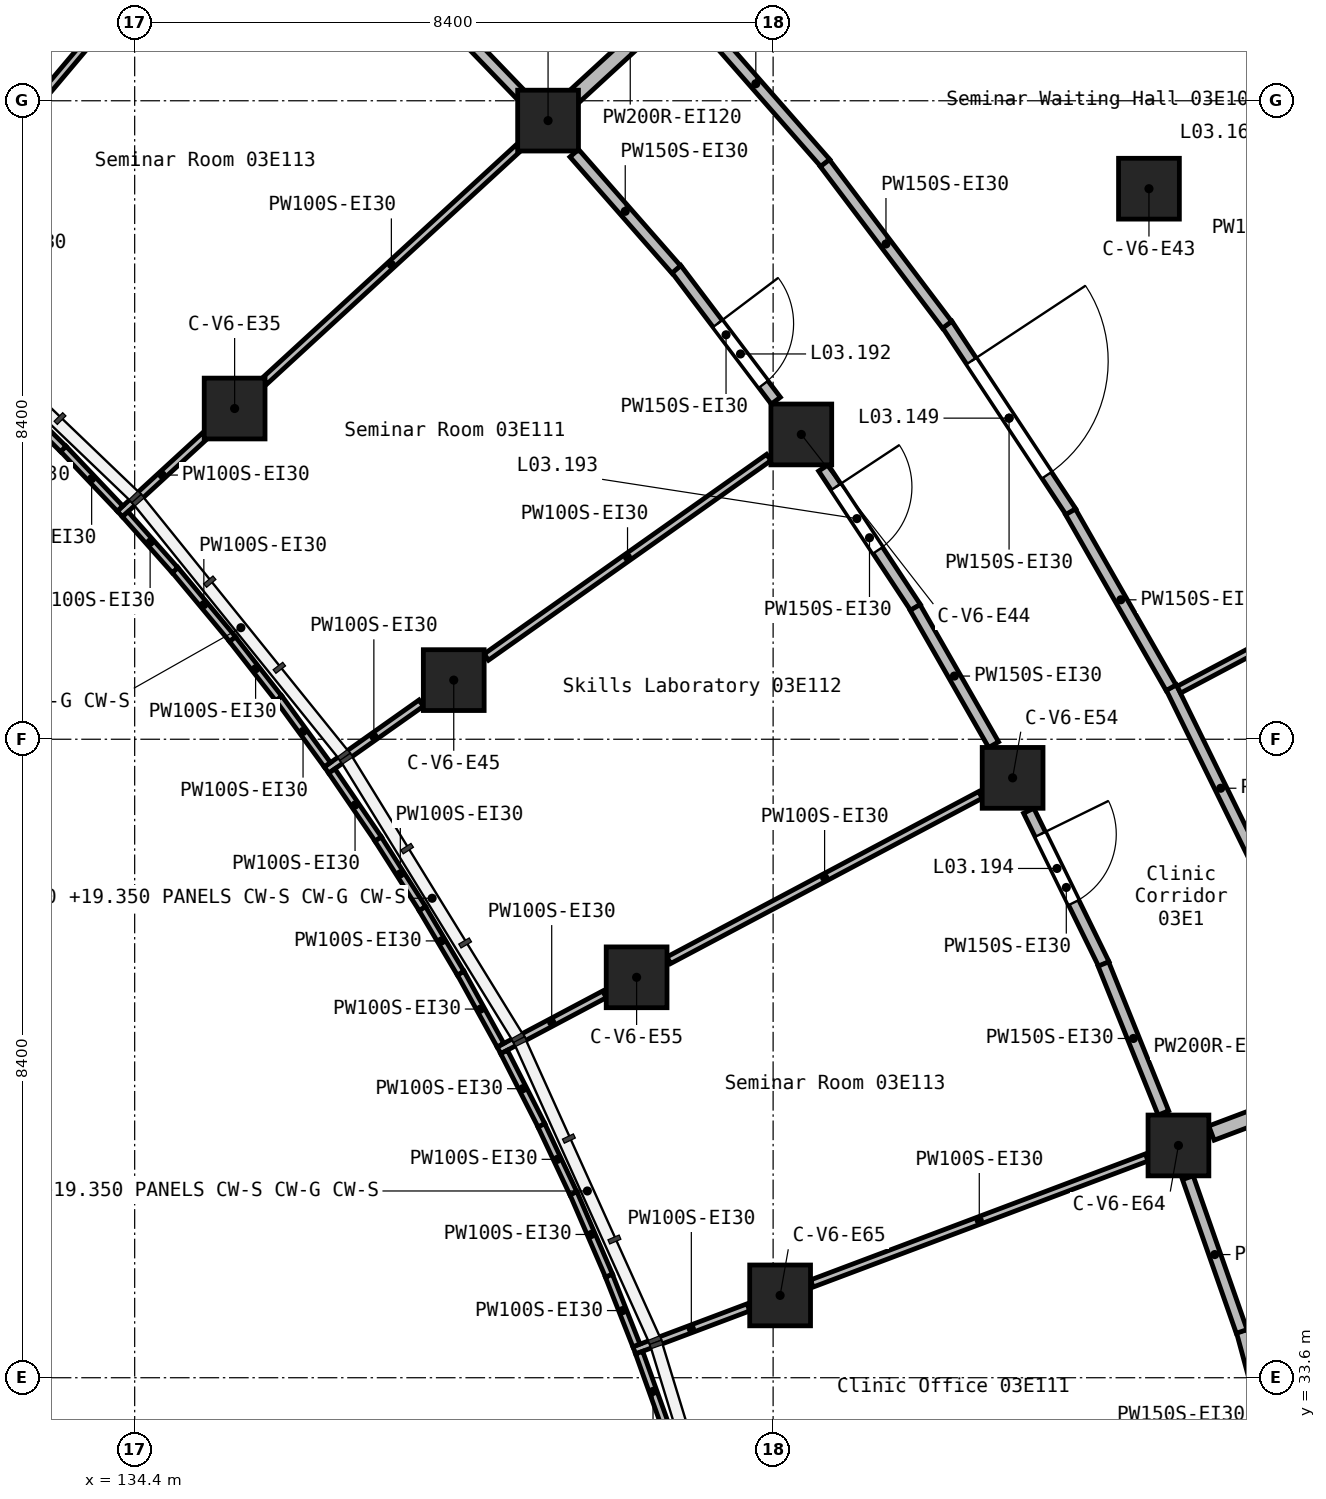
"""IFC4 building model, lengths in metres.
Left out: names, types, materials, properties, quantities, classifications, styles, units other than length and angle.
Written with IfcOpenShell. Run it as: python <this file> out.ifc"""

import sys

from ifc_helpers import new_model, si_unit, direction, frame, frame_2d, origin, origin_2d, place, context, subcontext, project, spatial, rectangle, extrude, element, fill, save


model = new_model("IFC4")
c1 = context("Model", 3, precision=1e-05, world=origin(), true_north=direction((0.0, 1.0)))
c2 = subcontext(c1, "Body", "Model", "MODEL_VIEW")
j1 = project(units=[si_unit("LENGTHUNIT", "METRE"), si_unit("PLANEANGLEUNIT", "RADIAN")], contexts=[c1])
p1 = place(None, origin())
s1 = spatial("IfcSite", under=j1, at=p1, CompositionType="ELEMENT")
p2 = place(p1, origin())
s2 = spatial("IfcBuilding", under=s1, at=p2, CompositionType="ELEMENT")
p3 = place(p2, frame((0.0, 0.0, 16.8)))
s3 = spatial("IfcBuildingStorey", under=s2, at=p3, CompositionType="ELEMENT", Elevation=16.8)
for number, where, z_axis, x_axis in (
    (1, (135.715, 46.351, 0.0), (0.0, 0.0, 1.0), (1.0, 0.0, 0.0)),
    (2, (138.598, 42.778, 0.0), (0.0, 0.0, 1.0), (1.0, 0.0, 0.0)),
    (3, (139.839, 50.139, 0.0), (0.0, 0.0, 1.0), (1.0, 0.0, 0.0)),
    (4, (141.004, 38.868, 0.0), (0.0, 0.0, 1.0), (1.0, 0.0, 0.0)),
    (5, (142.892, 34.683, 0.0), (0.0, 0.0, 1.0), (1.0, 0.0, 0.0)),
    (6, (143.171, 46.01, 0.0), (0.0, 0.0, 1.0), (1.0, 0.0, 0.0)),
    (7, (145.951, 41.492, 0.0), (0.0, 0.0, 1.0), (1.0, 0.0, 0.0)),
    (8, (147.745, 49.243, 0.0), (0.0, 0.0, 1.0), (1.0, 0.0, 0.0)),
    (9, (148.133, 36.656, 0.0), (0.0, 0.0, 1.0), (1.0, 0.0, 0.0)),
):
    element("IfcColumn", number, at=place(p3, frame(where, z_axis=z_axis, x_axis=x_axis)), inside=s3, PredefinedType="COLUMN", context=c2, shape_type="SweptSolid", body=[
        extrude(rectangle(XDim=0.8, YDim=0.8, at=origin_2d()), origin(), (0.0, 0.0, 1.0), 4.2),
    ])
p4 = place(p3, frame((140.196, 50.467, 0.0), z_axis=(0.0, 0.0, 1.0), x_axis=(0.736519787736, 0.676415997943, 0.0)))
e10 = element("IfcWall", 10, at=p4, inside=s3, PredefinedType="SOLIDWALL", context=c2, shape_type="SweptSolid", body=[
    extrude(rectangle(XDim=1.966, YDim=0.2, at=frame_2d((0.983, 0.0))), origin(), (0.0, 0.0, 1.0), 3.9),
])
p5 = place(p3, frame((148.567, 36.819, 0.0), z_axis=(0.0, 0.0, 1.0), x_axis=(0.935934561344, 0.352173958268, 0.0)))
e11 = element("IfcWall", 11, at=p5, inside=s3, PredefinedType="SOLIDWALL", context=c2, shape_type="SweptSolid", body=[
    extrude(rectangle(XDim=1.986, YDim=0.2, at=frame_2d((0.993, 0.0))), origin(), (0.0, 0.0, 1.0), 3.9),
])
p6 = place(p3, frame((148.038, 42.683, 0.0), z_axis=(0.0, 0.0, 1.0), x_axis=(0.440200278942, -0.897899612663, 0.0)))
e12 = element("IfcWall", 12, at=p6, inside=s3, PredefinedType="PARTITIONING", context=c2, shape_type="SweptSolid", body=[
    extrude(rectangle(XDim=2.958, YDim=0.15, at=frame_2d((1.479, 0.0))), origin(), (0.0, 0.0, 1.0), 3.9),
])
p7 = place(p3, frame((145.09, 47.458, 0.0), z_axis=(0.0, 0.0, 1.0), x_axis=(0.551018151494, -0.834493257447, 0.0)))
e13 = element("IfcWall", 13, at=p7, inside=s3, PredefinedType="PARTITIONING", context=c2, shape_type="SweptSolid", body=[
    extrude(rectangle(XDim=2.958, YDim=0.15, at=frame_2d((1.479, 0.0))), origin(), (0.0, 0.0, 1.0), 3.9),
])
p8 = place(p7, frame((0.579, 0.0, 0.0)))
e14 = element("IfcOpeningElement", 14, at=p8, cuts=e13, PredefinedType="OPENING", context=c2, shape_type="SweptSolid", body=[
    extrude(rectangle(XDim=1.8, YDim=2.1, at=frame_2d((0.9, 1.05))), frame((0.0, 0.085, 0.0), z_axis=(0.0, -1.0, 0.0), x_axis=(1.0, 0.0, 0.0)), (0.0, 0.0, 1.0), 0.17),
])
p9 = place(p3, frame((146.713, 44.992, 0.0), z_axis=(0.0, 0.0, 1.0), x_axis=(0.49622768999, -0.868192420888, 0.0)))
e15 = element("IfcWall", 15, at=p9, inside=s3, PredefinedType="PARTITIONING", context=c2, shape_type="SweptSolid", body=[
    extrude(rectangle(XDim=2.666, YDim=0.15, at=frame_2d((1.333, 0.0))), origin(), (0.0, 0.0, 1.0), 3.9),
])
p10 = place(p3, frame((141.656, 51.669, 0.0), z_axis=(0.0, 0.0, 1.0), x_axis=(0.659076402407, -0.752075990702, 0.0)))
e16 = element("IfcWall", 16, at=p10, inside=s3, PredefinedType="PARTITIONING", context=c2, shape_type="SweptSolid", body=[
    extrude(rectangle(XDim=2.78, YDim=0.15, at=frame_2d((1.39, 0.0))), origin(), (0.0, 0.0, 1.0), 3.9),
])
p11 = place(p3, frame((143.481, 49.579, 0.0), z_axis=(0.0, 0.0, 1.0), x_axis=(0.602824021104, -0.797874175281, 0.0)))
e17 = element("IfcWall", 17, at=p11, inside=s3, PredefinedType="PARTITIONING", context=c2, shape_type="SweptSolid", body=[
    extrude(rectangle(XDim=2.666, YDim=0.15, at=frame_2d((1.333, 0.0))), origin(), (0.0, 0.0, 1.0), 3.9),
])
p12 = place(p3, frame((146.163, 41.06, 0.0), z_axis=(0.0, 0.0, 1.0), x_axis=(0.439946079235, -0.898024190858, 0.0)))
e18 = element("IfcWall", 18, at=p12, inside=s3, PredefinedType="PARTITIONING", context=c2, shape_type="SweptSolid", body=[
    extrude(rectangle(XDim=2.249, YDim=0.15, at=frame_2d((1.124, 0.0))), origin(), (0.0, 0.0, 1.0), 3.9),
])
p13 = place(p12, frame((0.346, 0.0, 0.0)))
e19 = element("IfcOpeningElement", 19, at=p13, cuts=e18, PredefinedType="OPENING", context=c2, shape_type="SweptSolid", body=[
    extrude(rectangle(XDim=1.0, YDim=2.1, at=frame_2d((0.5, 1.05))), frame((0.0, 0.085, 0.0), z_axis=(0.0, -1.0, 0.0), x_axis=(1.0, 0.0, 0.0)), (0.0, 0.0, 1.0), 0.17),
])
p14 = place(p3, frame((141.526, 48.188, 0.0), z_axis=(0.0, 0.0, 1.0), x_axis=(0.60280129331, -0.797891346477, 0.0)))
e20 = element("IfcWall", 20, at=p14, inside=s3, PredefinedType="PARTITIONING", context=c2, shape_type="SweptSolid", body=[
    extrude(rectangle(XDim=2.172, YDim=0.15, at=frame_2d((1.086, 0.0))), origin(), (0.0, 0.0, 1.0), 3.9),
])
p15 = place(p14, frame((0.902, 0.0, 0.0)))
e21 = element("IfcOpeningElement", 21, at=p15, cuts=e20, PredefinedType="OPENING", context=c2, shape_type="SweptSolid", body=[
    extrude(rectangle(XDim=1.0, YDim=2.1, at=frame_2d((0.5, 1.05))), frame((0.0, 0.085, 0.0), z_axis=(0.0, -1.0, 0.0), x_axis=(1.0, 0.0, 0.0)), (0.0, 0.0, 1.0), 0.17),
])
p16 = place(p3, frame((148.969, 34.215, 0.0), z_axis=(0.0, 0.0, 1.0), x_axis=(0.26138863195, -0.965233641709, 0.0)))
e22 = element("IfcWall", 22, at=p16, inside=s3, PredefinedType="PARTITIONING", context=c2, shape_type="SweptSolid", body=[
    extrude(rectangle(XDim=2.295, YDim=0.15, at=frame_2d((1.147, 0.0))), origin(), (0.0, 0.0, 1.0), 3.9),
])
p17 = place(p16, frame((0.902, 0.0, 0.0)))
e23 = element("IfcOpeningElement", 23, at=p17, cuts=e22, PredefinedType="OPENING", context=c2, shape_type="SweptSolid", body=[
    extrude(rectangle(XDim=1.0, YDim=2.1, at=frame_2d((0.5, 1.05))), frame((0.0, 0.085, 0.0), z_axis=(0.0, -1.0, 0.0), x_axis=(1.0, 0.0, 0.0)), (0.0, 0.0, 1.0), 0.17),
])
p18 = place(p3, frame((143.462, 45.57, 0.0), z_axis=(0.0, 0.0, 1.0), x_axis=(0.550880835548, -0.834583911315, 0.0)))
e24 = element("IfcWall", 24, at=p18, inside=s3, PredefinedType="PARTITIONING", context=c2, shape_type="SweptSolid", body=[
    extrude(rectangle(XDim=2.201, YDim=0.15, at=frame_2d((1.101, 0.0))), origin(), (0.0, 0.0, 1.0), 3.9),
])
p19 = place(p18, frame((0.299, 0.0, 0.0)))
e25 = element("IfcOpeningElement", 25, at=p19, cuts=e24, PredefinedType="OPENING", context=c2, shape_type="SweptSolid", body=[
    extrude(rectangle(XDim=1.0, YDim=2.1, at=frame_2d((0.5, 1.05))), frame((0.0, 0.085, 0.0), z_axis=(0.0, -1.0, 0.0), x_axis=(1.0, 0.0, 0.0)), (0.0, 0.0, 1.0), 0.17),
])
p20 = place(p3, frame((144.668, 43.734, 0.0), z_axis=(0.0, 0.0, 1.0), x_axis=(0.496694973164, -0.867925171679, 0.0)))
e26 = element("IfcWall", 26, at=p20, inside=s3, PredefinedType="PARTITIONING", context=c2, shape_type="SweptSolid", body=[
    extrude(rectangle(XDim=2.08, YDim=0.15, at=frame_2d((1.04, 0.0))), origin(), (0.0, 0.0, 1.0), 3.9),
])
p21 = place(p3, frame((147.145, 39.043, 0.0), z_axis=(0.0, 0.0, 1.0), x_axis=(0.373899406404, -0.927469263043, 0.0)))
e27 = element("IfcWall", 27, at=p21, inside=s3, PredefinedType="PARTITIONING", context=c2, shape_type="SweptSolid", body=[
    extrude(rectangle(XDim=2.113, YDim=0.15, at=frame_2d((1.057, 0.0))), origin(), (0.0, 0.0, 1.0), 3.9),
])
p22 = place(p3, frame((148.257, 36.232, 0.0), z_axis=(0.0, 0.0, 1.0), x_axis=(0.330477279651, -0.943813947574, 0.0)))
e28 = element("IfcWall", 28, at=p22, inside=s3, PredefinedType="PARTITIONING", context=c2, shape_type="SweptSolid", body=[
    extrude(rectangle(XDim=2.143, YDim=0.15, at=frame_2d((1.072, 0.0))), origin(), (0.0, 0.0, 1.0), 3.9),
])
p23 = place(p3, frame((140.184, 49.71, 0.0), z_axis=(0.0, 0.0, 1.0), x_axis=(0.659209376091, -0.751959439381, 0.0)))
e29 = element("IfcWall", 29, at=p23, inside=s3, PredefinedType="PARTITIONING", context=c2, shape_type="SweptSolid", body=[
    extrude(rectangle(XDim=2.035, YDim=0.15, at=frame_2d((1.017, 0.0))), origin(), (0.0, 0.0, 1.0), 3.9),
])
p24 = place(p3, frame((138.031, 51.985, 0.0), z_axis=(0.0, 0.0, 1.0), x_axis=(0.693216793474, -0.7207291289, 0.0)))
e30 = element("IfcWall", 30, at=p24, inside=s3, PredefinedType="PARTITIONING", context=c2, shape_type="SweptSolid", body=[
    extrude(rectangle(XDim=2.076, YDim=0.15, at=frame_2d((1.038, 0.0))), origin(), (0.0, 0.0, 1.0), 3.9),
])
p25 = place(p3, frame((148.599, 52.122, 0.0), z_axis=(0.0, 0.0, 1.0), x_axis=(0.595875663086, -0.803076705017, 0.0)))
e31 = element("IfcWall", 31, at=p25, inside=s3, PredefinedType="PARTITIONING", context=c2, shape_type="SweptSolid", body=[
    extrude(rectangle(XDim=1.414, YDim=0.15, at=frame_2d((0.707, 0.0))), origin(), (0.0, 0.0, 1.0), 3.9),
])
p26 = place(p3, frame((132.762, 49.958, 0.0), z_axis=(0.0, 0.0, 1.0), x_axis=(0.644429680937, 0.76466357722, 0.0)))
e32 = element("IfcWall", 32, at=p26, inside=s3, PredefinedType="PARTITIONING", context=c2, shape_type="SweptSolid", body=[
    extrude(rectangle(XDim=4.475, YDim=0.1, at=frame_2d((2.238, 0.0))), origin(), (0.0, 0.0, 1.0), 3.9),
])
p27 = place(p3, frame((139.193, 37.908, 0.0), z_axis=(0.0, 0.0, 1.0), x_axis=(0.883481589726, 0.468465879884, 0.0)))
e33 = element("IfcWall", 33, at=p27, inside=s3, PredefinedType="PARTITIONING", context=c2, shape_type="SweptSolid", body=[
    extrude(rectangle(XDim=1.571, YDim=0.1, at=frame_2d((0.786, 0.0))), origin(), (0.0, 0.0, 1.0), 3.9),
])
p28 = place(p3, frame((141.427, 39.093, 0.0), z_axis=(0.0, 0.0, 1.0), x_axis=(0.88344099274, 0.46854243388, 0.0)))
e34 = element("IfcWall", 34, at=p28, inside=s3, PredefinedType="PARTITIONING", context=c2, shape_type="SweptSolid", body=[
    extrude(rectangle(XDim=4.642, YDim=0.1, at=frame_2d((2.321, 0.0))), origin(), (0.0, 0.0, 1.0), 3.9),
])
p29 = place(p3, frame((136.924, 41.595, 0.0), z_axis=(0.0, 0.0, 1.0), x_axis=(0.816643847366, 0.577141946629, 0.0)))
e35 = element("IfcWall", 35, at=p29, inside=s3, PredefinedType="PARTITIONING", context=c2, shape_type="SweptSolid", body=[
    extrude(rectangle(XDim=1.525, YDim=0.1, at=frame_2d((0.762, 0.0))), origin(), (0.0, 0.0, 1.0), 3.9),
])
p30 = place(p3, frame((139.026, 43.081, 0.0), z_axis=(0.0, 0.0, 1.0), x_axis=(0.816637661001, 0.577150700108, 0.0)))
e36 = element("IfcWall", 36, at=p30, inside=s3, PredefinedType="PARTITIONING", context=c2, shape_type="SweptSolid", body=[
    extrude(rectangle(XDim=4.551, YDim=0.1, at=frame_2d((2.275, 0.0))), origin(), (0.0, 0.0, 1.0), 3.9),
])
p31 = place(p3, frame((140.973, 33.96, 0.0), z_axis=(0.0, 0.0, 1.0), x_axis=(0.935890679388, 0.35229055655, 0.0)))
e37 = element("IfcWall", 37, at=p31, inside=s3, PredefinedType="PARTITIONING", context=c2, shape_type="SweptSolid", body=[
    extrude(rectangle(XDim=1.604, YDim=0.1, at=frame_2d((0.802, 0.0))), origin(), (0.0, 0.0, 1.0), 3.9),
])
p32 = place(p3, frame((143.309, 34.84, 0.0), z_axis=(0.0, 0.0, 1.0), x_axis=(0.935891610639, 0.352288082591, 0.0)))
e38 = element("IfcWall", 38, at=p32, inside=s3, PredefinedType="PARTITIONING", context=c2, shape_type="SweptSolid", body=[
    extrude(rectangle(XDim=4.708, YDim=0.1, at=frame_2d((2.354, 0.0))), origin(), (0.0, 0.0, 1.0), 3.9),
])
p33 = place(p3, frame((134.205, 44.964, 0.0), z_axis=(0.0, 0.0, 1.0), x_axis=(0.736497059378, 0.676440745023, 0.0)))
e39 = element("IfcWall", 39, at=p33, inside=s3, PredefinedType="PARTITIONING", context=c2, shape_type="SweptSolid", body=[
    extrude(rectangle(XDim=1.512, YDim=0.1, at=frame_2d((0.756, 0.0))), origin(), (0.0, 0.0, 1.0), 3.9),
])
p34 = place(p3, frame((136.111, 46.715, 0.0), z_axis=(0.0, 0.0, 1.0), x_axis=(0.736475017651, 0.676464742892, 0.0)))
e40 = element("IfcWall", 40, at=p34, inside=s3, PredefinedType="PARTITIONING", context=c2, shape_type="SweptSolid", body=[
    extrude(rectangle(XDim=4.524, YDim=0.1, at=frame_2d((2.262, 0.0))), origin(), (0.0, 0.0, 1.0), 3.9),
])
p35 = place(p3, frame((148.139, 42.652, 0.0), z_axis=(0.0, 0.0, 1.0), x_axis=(0.883500310686, 0.468430572249, 0.0)))
e41 = element("IfcWall", 41, at=p35, inside=s3, PredefinedType="PARTITIONING", context=c2, shape_type="SweptSolid", body=[
    extrude(rectangle(XDim=2.645, YDim=0.1, at=frame_2d((1.322, 0.0))), origin(), (0.0, 0.0, 1.0), 3.9),
])
p36 = place(p3, frame((139.26, 37.886, 0.0), z_axis=(0.0, 0.0, 1.0), x_axis=(0.454222477174, -0.890888287738, 0.0)))
e42 = element("IfcWall", 42, at=p36, inside=s3, PredefinedType="PARTITIONING", context=c2, shape_type="SweptSolid", body=[
    extrude(rectangle(XDim=1.085, YDim=0.1, at=frame_2d((0.542, 0.0))), origin(), (0.0, 0.0, 1.0), 3.9),
])
for number, where, z_axis, x_axis in (
    (43, (133.461, 45.821, 0.0), (0.0, 0.0, 1.0), (0.688, -0.725, 0.0)),
    (44, (136.994, 41.582, 0.0), (0.0, 0.0, 1.0), (0.564, -0.826, 0.0)),
):
    element("IfcWall", number, at=place(p3, frame(where, z_axis=z_axis, x_axis=x_axis)), inside=s3, PredefinedType="PARTITIONING", context=c2, shape_type="SweptSolid", body=[
        extrude(rectangle(XDim=1.084, YDim=0.1, at=frame_2d((0.542, 0.0))), origin(), (0.0, 0.0, 1.0), 3.9),
    ])
p37 = place(p3, frame((134.931, 44.226, 0.0), z_axis=(0.0, 0.0, 1.0), x_axis=(0.639778970268, -0.768558956231, 0.0)))
e45 = element("IfcWall", 45, at=p37, inside=s3, PredefinedType="PARTITIONING", context=c2, shape_type="SweptSolid", body=[
    extrude(rectangle(XDim=1.185, YDim=0.1, at=frame_2d((0.592, 0.0))), origin(), (0.0, 0.0, 1.0), 3.9),
])
p38 = place(p3, frame((137.603, 40.687, 0.0), z_axis=(0.0, 0.0, 1.0), x_axis=(0.53747146193, -0.843281938388, 0.0)))
e46 = element("IfcWall", 46, at=p38, inside=s3, PredefinedType="PARTITIONING", context=c2, shape_type="SweptSolid", body=[
    extrude(rectangle(XDim=1.086, YDim=0.1, at=frame_2d((0.543, 0.0))), origin(), (0.0, 0.0, 1.0), 3.9),
])
for number, where, z_axis, x_axis in (
    (47, (138.689, 38.925, 0.0), (0.0, 0.0, 1.0), (0.483, -0.876, 0.0)),
    (48, (136.295, 42.54, 0.0), (0.0, 0.0, 1.0), (0.59, -0.807, 0.0)),
):
    element("IfcWall", number, at=place(p3, frame(where, z_axis=z_axis, x_axis=x_axis)), inside=s3, PredefinedType="PARTITIONING", context=c2, shape_type="SweptSolid", body=[
        extrude(rectangle(XDim=1.084, YDim=0.1, at=frame_2d((0.542, 0.0))), origin(), (0.0, 0.0, 1.0), 3.9),
    ])
p39 = place(p3, frame((140.172, 36.029, 0.0), z_axis=(0.0, 0.0, 1.0), x_axis=(0.396479436871, -0.918043602526, 0.0)))
e49 = element("IfcWall", 49, at=p39, inside=s3, PredefinedType="PARTITIONING", context=c2, shape_type="SweptSolid", body=[
    extrude(rectangle(XDim=1.185, YDim=0.1, at=frame_2d((0.592, 0.0))), origin(), (0.0, 0.0, 1.0), 3.9),
])
p40 = place(p3, frame((132.758, 46.514, 0.0), z_axis=(0.0, 0.0, 1.0), x_axis=(0.710804317615, -0.703389808043, 0.0)))
e50 = element("IfcWall", 50, at=p40, inside=s3, PredefinedType="PARTITIONING", context=c2, shape_type="SweptSolid", body=[
    extrude(rectangle(XDim=0.988, YDim=0.1, at=frame_2d((0.494, 0.0))), origin(), (0.0, 0.0, 1.0), 3.9),
])
p41 = place(p3, frame((140.64, 34.942, 0.0), z_axis=(0.0, 0.0, 1.0), x_axis=(0.366901413892, -0.93025983063, 0.0)))
e51 = element("IfcWall", 51, at=p41, inside=s3, PredefinedType="PARTITIONING", context=c2, shape_type="SweptSolid", body=[
    extrude(rectangle(XDim=0.986, YDim=0.1, at=frame_2d((0.493, 0.0))), origin(), (0.0, 0.0, 1.0), 3.9),
])
p42 = place(p3, frame((141.037, 33.93, 0.0), z_axis=(0.0, 0.0, 1.0), x_axis=(0.337434932816, -0.941348854631, 0.0)))
e52 = element("IfcWall", 52, at=p42, inside=s3, PredefinedType="PARTITIONING", context=c2, shape_type="SweptSolid", body=[
    extrude(rectangle(XDim=1.084, YDim=0.1, at=frame_2d((0.542, 0.0))), origin(), (0.0, 0.0, 1.0), 3.9),
])
p43 = place(p3, frame((134.276, 44.96, 0.0), z_axis=(0.0, 0.0, 1.0), x_axis=(0.66477897218, -0.747040104779, 0.0)))
e53 = element("IfcWall", 53, at=p43, inside=s3, PredefinedType="PARTITIONING", context=c2, shape_type="SweptSolid", body=[
    extrude(rectangle(XDim=0.985, YDim=0.1, at=frame_2d((0.493, 0.0))), origin(), (0.0, 0.0, 1.0), 3.9),
])
for number, where, z_axis, x_axis in (
    (54, (139.751, 36.92, 0.0), (0.0, 0.0, 1.0), (0.426, -0.905, 0.0)),
    (55, (135.687, 43.316, 0.0), (0.0, 0.0, 1.0), (0.616, -0.788, 0.0)),
):
    element("IfcWall", number, at=place(p3, frame(where, z_axis=z_axis, x_axis=x_axis)), inside=s3, PredefinedType="PARTITIONING", context=c2, shape_type="SweptSolid", body=[
        extrude(rectangle(XDim=0.987, YDim=0.1, at=frame_2d((0.494, 0.0))), origin(), (0.0, 0.0, 1.0), 3.9),
    ])
p44 = place(p3, frame((138.185, 39.771, 0.0), z_axis=(0.0, 0.0, 1.0), x_axis=(0.51019570921, -0.860058334245, 0.0)))
e56 = element("IfcWall", 56, at=p44, inside=s3, PredefinedType="PARTITIONING", context=c2, shape_type="SweptSolid", body=[
    extrude(rectangle(XDim=0.987, YDim=0.1, at=frame_2d((0.493, 0.0))), origin(), (0.0, 0.0, 1.0), 3.9),
])
p45 = place(p8, frame((1.8, 0.0, 0.0), z_axis=(0.0, 0.0, 1.0), x_axis=(-1.0, 0.0, 0.0)))
e57 = element("IfcDoor", 57, at=p45, inside=s3, OperationType="DOUBLE_DOOR_SINGLE_SWING", PredefinedType="DOOR", context=c2, shape_type="SweptSolid", body=[
    extrude(rectangle(XDim=1.8, YDim=2.1, at=frame_2d((0.9, 1.05))), frame((0.0, 0.025, 0.0), z_axis=(0.0, -1.0, 0.0), x_axis=(1.0, 0.0, 0.0)), (0.0, 0.0, 1.0), 0.05),
])
fill(e14, e57)
p46 = place(p15, frame((1.0, 0.0, 0.0), z_axis=(0.0, 0.0, 1.0), x_axis=(-1.0, 0.0, 0.0)))
e58 = element("IfcDoor", 58, at=p46, inside=s3, OperationType="SINGLE_SWING_LEFT", PredefinedType="DOOR", context=c2, shape_type="SweptSolid", body=[
    extrude(rectangle(XDim=1.0, YDim=2.1, at=frame_2d((0.5, 1.05))), frame((0.0, 0.025, 0.0), z_axis=(0.0, -1.0, 0.0), x_axis=(1.0, 0.0, 0.0)), (0.0, 0.0, 1.0), 0.05),
])
fill(e21, e58)
p47 = place(p19, frame((1.0, 0.0, 0.0), z_axis=(0.0, 0.0, 1.0), x_axis=(-1.0, 0.0, 0.0)))
e59 = element("IfcDoor", 59, at=p47, inside=s3, OperationType="SINGLE_SWING_RIGHT", PredefinedType="DOOR", context=c2, shape_type="SweptSolid", body=[
    extrude(rectangle(XDim=1.0, YDim=2.1, at=frame_2d((0.5, 1.05))), frame((0.0, 0.025, 0.0), z_axis=(0.0, -1.0, 0.0), x_axis=(1.0, 0.0, 0.0)), (0.0, 0.0, 1.0), 0.05),
])
fill(e25, e59)
p48 = place(p13, frame((1.0, 0.0, 0.0), z_axis=(0.0, 0.0, 1.0), x_axis=(-1.0, 0.0, 0.0)))
e60 = element("IfcDoor", 60, at=p48, inside=s3, OperationType="SINGLE_SWING_RIGHT", PredefinedType="DOOR", context=c2, shape_type="SweptSolid", body=[
    extrude(rectangle(XDim=1.0, YDim=2.1, at=frame_2d((0.5, 1.05))), frame((0.0, 0.025, 0.0), z_axis=(0.0, -1.0, 0.0), x_axis=(1.0, 0.0, 0.0)), (0.0, 0.0, 1.0), 0.05),
])
fill(e19, e60)
save(model, sys.argv[1])
